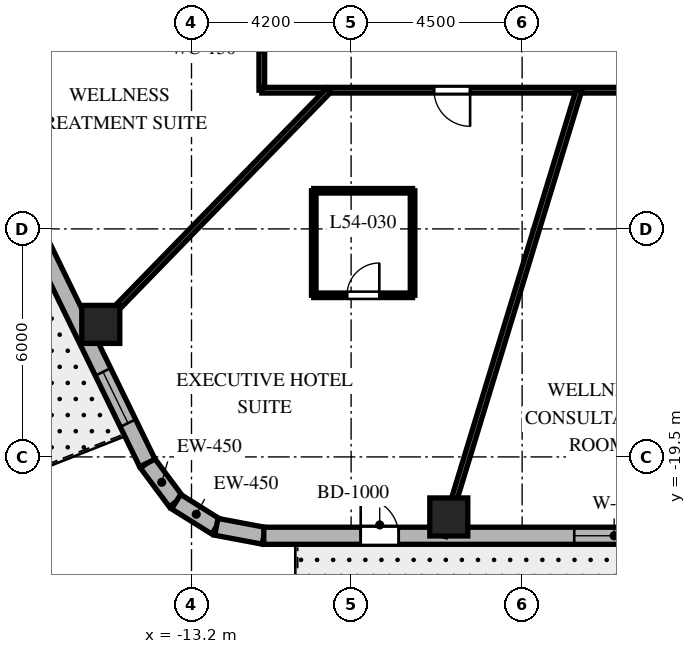
"""IFC4 building model, lengths in metres.
Left out: names, types, materials, properties, quantities, classifications, styles, units other than length and angle.
Written with IfcOpenShell. Run it as: python <this file> out.ifc"""

import sys

from ifc_helpers import new_model, si_unit, direction, frame, frame_2d, origin, origin_2d, place, context, subcontext, project, spatial, rectangle, extrude, element, fill, save


model = new_model("IFC4")
c1 = context("Model", 3, precision=1e-05, world=origin(), true_north=direction((0.0, 1.0)))
c2 = subcontext(c1, "Body", "Model", "MODEL_VIEW")
j1 = project(units=[si_unit("LENGTHUNIT", "METRE"), si_unit("PLANEANGLEUNIT", "RADIAN")], contexts=[c1])
p1 = place(None, origin())
s1 = spatial("IfcSite", under=j1, at=p1, CompositionType="ELEMENT")
p2 = place(p1, origin())
s2 = spatial("IfcBuilding", under=s1, at=p2, CompositionType="ELEMENT")
p3 = place(p2, frame((0.0, 0.0, 217.9)))
s3 = spatial("IfcBuildingStorey", under=s2, at=p3, CompositionType="ELEMENT", Elevation=217.9)
for number, where, z_axis, x_axis in (
    (1, (-6.43, -21.08, 0.0), (0.0, 0.0, 1.0), (1.0, 0.0, 0.0)),
    (2, (-15.587, -16.013, 0.0), (0.0, 0.0, 1.0), (1.0, 0.0, 0.0)),
):
    element("IfcColumn", number, at=place(p3, frame(where, z_axis=z_axis, x_axis=x_axis)), inside=s3, PredefinedType="COLUMN", context=c2, shape_type="SweptSolid", body=[
        extrude(rectangle(XDim=1.0, YDim=1.0, at=origin_2d()), origin(), (0.0, 0.0, 1.0), 3.8),
    ])
p4 = place(p3, frame((-14.362, -19.658, 0.0), z_axis=(0.0, 0.0, 1.0), x_axis=(0.596642462792, -0.80250717853, 0.0)))
e3 = element("IfcWall", 3, at=p4, inside=s3, PredefinedType="SOLIDWALL", context=c2, shape_type="SweptSolid", body=[
    extrude(rectangle(XDim=1.27, YDim=0.45, at=frame_2d((0.635, 0.0))), origin(), (0.0, 0.0, 1.0), 3.5),
])
p5 = place(p3, frame((-13.604, -20.678, 0.0), z_axis=(0.0, 0.0, 1.0), x_axis=(0.847910404124, -0.53013955387, 0.0)))
e4 = element("IfcWall", 4, at=p5, inside=s3, PredefinedType="SOLIDWALL", context=c2, shape_type="SweptSolid", body=[
    extrude(rectangle(XDim=1.249, YDim=0.45, at=frame_2d((0.624, 0.0))), origin(), (0.0, 0.0, 1.0), 3.5),
])
p6 = place(p3, frame((-12.546, -21.34, 0.0), z_axis=(0.0, 0.0, 1.0), x_axis=(0.982686750835, -0.18527479519, 0.0)))
e5 = element("IfcWall", 5, at=p6, inside=s3, PredefinedType="SOLIDWALL", context=c2, shape_type="SweptSolid", body=[
    extrude(rectangle(XDim=1.27, YDim=0.45, at=frame_2d((0.635, 0.0))), origin(), (0.0, 0.0, 1.0), 3.5),
])
p7 = place(p3, frame((-11.298, -21.575, 0.0), z_axis=(0.0, 0.0, 1.0), x_axis=(1.0, 0.0, 0.0)))
e6 = element("IfcWall", 6, at=p7, inside=s3, PredefinedType="SOLIDWALL", context=c2, shape_type="SweptSolid", body=[
    extrude(rectangle(XDim=24.399, YDim=0.45, at=frame_2d((12.2, 0.0))), origin(), (0.0, 0.0, 1.0), 3.5),
])
p8 = place(p7, frame((2.55, 0.0, 0.0)))
e7 = element("IfcOpeningElement", 7, at=p8, cuts=e6, PredefinedType="OPENING", context=c2, shape_type="SweptSolid", body=[
    extrude(rectangle(XDim=1.0, YDim=2.15, at=frame_2d((0.5, 1.075))), frame((0.0, 0.235, 0.0), z_axis=(0.0, -1.0, 0.0), x_axis=(1.0, 0.0, 0.0)), (0.0, 0.0, 1.0), 0.47),
])
p9 = place(p7, frame((8.169, 0.0, 0.8)))
e8 = element("IfcOpeningElement", 8, at=p9, cuts=e6, PredefinedType="OPENING", context=c2, shape_type="SweptSolid", body=[
    extrude(rectangle(XDim=2.1, YDim=1.85, at=frame_2d((1.05, 0.925))), frame((0.0, 0.235, 0.0), z_axis=(0.0, -1.0, 0.0), x_axis=(1.0, 0.0, 0.0)), (0.0, 0.0, 1.0), 0.47),
])
p10 = place(p7, frame((14.922, 0.0, 0.8)))
e9 = element("IfcOpeningElement", 9, at=p10, cuts=e6, PredefinedType="OPENING", context=c2, shape_type="SweptSolid", body=[
    extrude(rectangle(XDim=2.1, YDim=1.85, at=frame_2d((1.05, 0.925))), frame((0.0, 0.235, 0.0), z_axis=(0.0, -1.0, 0.0), x_axis=(1.0, 0.0, 0.0)), (0.0, 0.0, 1.0), 0.47),
])
p11 = place(p7, frame((20.996, 0.0, 0.8)))
e10 = element("IfcOpeningElement", 10, at=p11, cuts=e6, PredefinedType="OPENING", context=c2, shape_type="SweptSolid", body=[
    extrude(rectangle(XDim=2.1, YDim=1.85, at=frame_2d((1.05, 0.925))), frame((0.0, 0.235, 0.0), z_axis=(0.0, -1.0, 0.0), x_axis=(1.0, 0.0, 0.0)), (0.0, 0.0, 1.0), 0.47),
])
p12 = place(p3, frame((-22.74, -2.452, 0.0), z_axis=(0.0, 0.0, 1.0), x_axis=(0.437753424814, -0.899095066755, 0.0)))
e11 = element("IfcWall", 11, at=p12, inside=s3, PredefinedType="SOLIDWALL", context=c2, shape_type="SweptSolid", body=[
    extrude(rectangle(XDim=19.137, YDim=0.45, at=frame_2d((9.569, 0.0))), origin(), (0.0, 0.0, 1.0), 3.5),
])
p13 = place(p12, frame((4.763, 0.0, 0.0)))
e12 = element("IfcOpeningElement", 12, at=p13, cuts=e11, PredefinedType="OPENING", context=c2, shape_type="SweptSolid", body=[
    extrude(rectangle(XDim=0.95, YDim=2.15, at=frame_2d((0.475, 1.075))), frame((0.0, 0.235, 0.0), z_axis=(0.0, -1.0, 0.0), x_axis=(1.0, 0.0, 0.0)), (0.0, 0.0, 1.0), 0.47),
])
p14 = place(p12, frame((1.216, 0.0, 0.8)))
e13 = element("IfcOpeningElement", 13, at=p14, cuts=e11, PredefinedType="OPENING", context=c2, shape_type="SweptSolid", body=[
    extrude(rectangle(XDim=1.5, YDim=1.8, at=frame_2d((0.75, 0.9))), frame((0.0, 0.235, 0.0), z_axis=(0.0, -1.0, 0.0), x_axis=(1.0, 0.0, 0.0)), (0.0, 0.0, 1.0), 0.47),
])
p15 = place(p12, frame((8.87, 0.0, 0.8)))
e14 = element("IfcOpeningElement", 14, at=p15, cuts=e11, PredefinedType="OPENING", context=c2, shape_type="SweptSolid", body=[
    extrude(rectangle(XDim=1.5, YDim=1.8, at=frame_2d((0.75, 0.9))), frame((0.0, 0.235, 0.0), z_axis=(0.0, -1.0, 0.0), x_axis=(1.0, 0.0, 0.0)), (0.0, 0.0, 1.0), 0.47),
])
p16 = place(p12, frame((16.473, 0.0, 0.8)))
e15 = element("IfcOpeningElement", 15, at=p16, cuts=e11, PredefinedType="OPENING", context=c2, shape_type="SweptSolid", body=[
    extrude(rectangle(XDim=1.5, YDim=1.8, at=frame_2d((0.75, 0.9))), frame((0.0, 0.235, 0.0), z_axis=(0.0, -1.0, 0.0), x_axis=(1.0, 0.0, 0.0)), (0.0, 0.0, 1.0), 0.47),
])
p17 = place(p3, frame((-11.35, -9.85, 0.0), z_axis=(0.0, 0.0, 1.0), x_axis=(0.0, 1.0, 0.0)))
e16 = element("IfcWall", 16, at=p17, inside=s3, PredefinedType="PARTITIONING", context=c2, shape_type="SweptSolid", body=[
    extrude(rectangle(XDim=12.4, YDim=0.15, at=frame_2d((6.2, 0.0))), origin(), (0.0, 0.0, 1.0), 2.99),
])
p18 = place(p17, frame((10.017, 0.0, 0.0)))
e17 = element("IfcOpeningElement", 17, at=p18, cuts=e16, PredefinedType="OPENING", context=c2, shape_type="SweptSolid", body=[
    extrude(rectangle(XDim=0.9, YDim=2.03, at=frame_2d((0.45, 1.015))), frame((0.0, 0.085, 0.0), z_axis=(0.0, -1.0, 0.0), x_axis=(1.0, 0.0, 0.0)), (0.0, 0.0, 1.0), 0.17),
])
p19 = place(p17, frame((7.427, 0.0, 0.0)))
e18 = element("IfcOpeningElement", 18, at=p19, cuts=e16, PredefinedType="OPENING", context=c2, shape_type="SweptSolid", body=[
    extrude(rectangle(XDim=0.9, YDim=2.03, at=frame_2d((0.45, 1.015))), frame((0.0, 0.085, 0.0), z_axis=(0.0, -1.0, 0.0), x_axis=(1.0, 0.0, 0.0)), (0.0, 0.0, 1.0), 0.17),
])
p20 = place(p17, frame((3.01, 0.0, 0.0)))
e19 = element("IfcOpeningElement", 19, at=p20, cuts=e16, PredefinedType="OPENING", context=c2, shape_type="SweptSolid", body=[
    extrude(rectangle(XDim=0.95, YDim=2.03, at=frame_2d((0.475, 1.015))), frame((0.0, 0.085, 0.0), z_axis=(0.0, -1.0, 0.0), x_axis=(1.0, 0.0, 0.0)), (0.0, 0.0, 1.0), 0.17),
])
p21 = place(p3, frame((-0.92, -9.85, 0.0), z_axis=(0.0, 0.0, 1.0), x_axis=(-1.0, 0.0, 0.0)))
e20 = element("IfcWall", 20, at=p21, inside=s3, PredefinedType="PARTITIONING", context=c2, shape_type="SweptSolid", body=[
    extrude(rectangle(XDim=10.43, YDim=0.15, at=frame_2d((5.215, 0.0))), origin(), (0.0, 0.0, 1.0), 2.99),
])
p22 = place(p21, frame((4.949, 0.0, 0.0)))
e21 = element("IfcOpeningElement", 21, at=p22, cuts=e20, PredefinedType="OPENING", context=c2, shape_type="SweptSolid", body=[
    extrude(rectangle(XDim=0.95, YDim=2.03, at=frame_2d((0.475, 1.015))), frame((0.0, 0.085, 0.0), z_axis=(0.0, -1.0, 0.0), x_axis=(1.0, 0.0, 0.0)), (0.0, 0.0, 1.0), 0.17),
])
p23 = place(p3, frame((-9.588, -9.85, 0.0), z_axis=(0.0, 0.0, 1.0), x_axis=(-0.697519469595, -0.716565830567, 0.0)))
e22 = element("IfcWall", 22, at=p23, inside=s3, PredefinedType="PARTITIONING", context=c2, shape_type="SweptSolid", body=[
    extrude(rectangle(XDim=9.126, YDim=0.15, at=frame_2d((4.563, 0.0))), origin(), (0.0, 0.0, 1.0), 2.74),
])
p24 = place(p3, frame((-3.004, -9.85, 0.0), z_axis=(0.0, 0.0, 1.0), x_axis=(-0.291775760688, -0.956486751333, 0.0)))
e23 = element("IfcWall", 23, at=p24, inside=s3, PredefinedType="PARTITIONING", context=c2, shape_type="SweptSolid", body=[
    extrude(rectangle(XDim=12.258, YDim=0.15, at=frame_2d((6.129, 0.0))), origin(), (0.0, 0.0, 1.0), 2.74),
])
p25 = place(p3, frame((-9.983, -15.247, 0.0), z_axis=(0.0, 0.0, 1.0), x_axis=(1.0, 0.0, 0.0)))
e24 = element("IfcWall", 24, at=p25, inside=s3, PredefinedType="PARTITIONING", context=c2, shape_type="SweptSolid", body=[
    extrude(rectangle(XDim=2.6, YDim=0.12, at=frame_2d((1.3, 0.0))), origin(), (0.0, 0.0, 1.0), 3.073),
])
p26 = place(p25, frame((0.875, 0.0, 0.0)))
e25 = element("IfcOpeningElement", 25, at=p26, cuts=e24, PredefinedType="OPENING", context=c2, shape_type="SweptSolid", body=[
    extrude(rectangle(XDim=0.85, YDim=2.03, at=frame_2d((0.425, 1.015))), frame((0.0, 0.07, 0.0), z_axis=(0.0, -1.0, 0.0), x_axis=(1.0, 0.0, 0.0)), (0.0, 0.0, 1.0), 0.14),
])
p27 = place(p3, frame((-7.383, -15.247, 0.0), z_axis=(0.0, 0.0, 1.0), x_axis=(0.0, 1.0, 0.0)))
e26 = element("IfcWall", 26, at=p27, inside=s3, PredefinedType="PARTITIONING", context=c2, shape_type="SweptSolid", body=[
    extrude(rectangle(XDim=2.75, YDim=0.12, at=frame_2d((1.375, 0.0))), origin(), (0.0, 0.0, 1.0), 2.941),
])
p28 = place(p3, frame((-7.383, -12.497, 0.0), z_axis=(0.0, 0.0, 1.0), x_axis=(-1.0, 0.0, 0.0)))
e27 = element("IfcWall", 27, at=p28, inside=s3, PredefinedType="PARTITIONING", context=c2, shape_type="SweptSolid", body=[
    extrude(rectangle(XDim=2.6, YDim=0.12, at=frame_2d((1.3, 0.0))), origin(), (0.0, 0.0, 1.0), 2.941),
])
p29 = place(p3, frame((-9.983, -12.497, 0.0), z_axis=(0.0, 0.0, 1.0), x_axis=(0.0, -1.0, 0.0)))
e28 = element("IfcWall", 28, at=p29, inside=s3, PredefinedType="PARTITIONING", context=c2, shape_type="SweptSolid", body=[
    extrude(rectangle(XDim=2.75, YDim=0.12, at=frame_2d((1.375, 0.0))), origin(), (0.0, 0.0, 1.0), 3.073),
])
p30 = place(p8, origin())
e29 = element("IfcDoor", 29, at=p30, inside=s3, OperationType="SINGLE_SWING_LEFT", PredefinedType="DOOR", context=c2, shape_type="SweptSolid", body=[
    extrude(rectangle(XDim=1.0, YDim=2.15, at=frame_2d((0.5, 1.075))), frame((0.0, 0.025, 0.0), z_axis=(0.0, -1.0, 0.0), x_axis=(1.0, 0.0, 0.0)), (0.0, 0.0, 1.0), 0.05),
])
fill(e7, e29)
p31 = place(p9, origin())
e30 = element("IfcWindow", 30, at=p31, inside=s3, PartitioningType="SINGLE_PANEL", PredefinedType="WINDOW", context=c2, shape_type="SweptSolid", body=[
    extrude(rectangle(XDim=2.1, YDim=1.85, at=frame_2d((1.05, 0.925))), frame((0.0, 0.03, 0.0), z_axis=(0.0, -1.0, 0.0), x_axis=(1.0, 0.0, 0.0)), (0.0, 0.0, 1.0), 0.06),
])
fill(e8, e30)
p32 = place(p16, origin())
e31 = element("IfcWindow", 31, at=p32, inside=s3, PartitioningType="SINGLE_PANEL", PredefinedType="WINDOW", context=c2, shape_type="SweptSolid", body=[
    extrude(rectangle(XDim=1.5, YDim=1.8, at=frame_2d((0.75, 0.9))), frame((0.0, 0.03, 0.0), z_axis=(0.0, -1.0, 0.0), x_axis=(1.0, 0.0, 0.0)), (0.0, 0.0, 1.0), 0.06),
])
fill(e15, e31)
p33 = place(p22, origin())
e32 = element("IfcDoor", 32, at=p33, inside=s3, OperationType="SINGLE_SWING_LEFT", PredefinedType="DOOR", context=c2, shape_type="SweptSolid", body=[
    extrude(rectangle(XDim=0.95, YDim=2.03, at=frame_2d((0.475, 1.015))), frame((0.0, 0.025, 0.0), z_axis=(0.0, -1.0, 0.0), x_axis=(1.0, 0.0, 0.0)), (0.0, 0.0, 1.0), 0.05),
])
fill(e21, e32)
p34 = place(p26, origin())
e33 = element("IfcDoor", 33, at=p34, inside=s3, OperationType="SINGLE_SWING_RIGHT", PredefinedType="DOOR", context=c2, shape_type="SweptSolid", body=[
    extrude(rectangle(XDim=0.85, YDim=2.03, at=frame_2d((0.425, 1.015))), frame((0.0, 0.025, 0.0), z_axis=(0.0, -1.0, 0.0), x_axis=(1.0, 0.0, 0.0)), (0.0, 0.0, 1.0), 0.05),
])
fill(e25, e33)
save(model, sys.argv[1])
